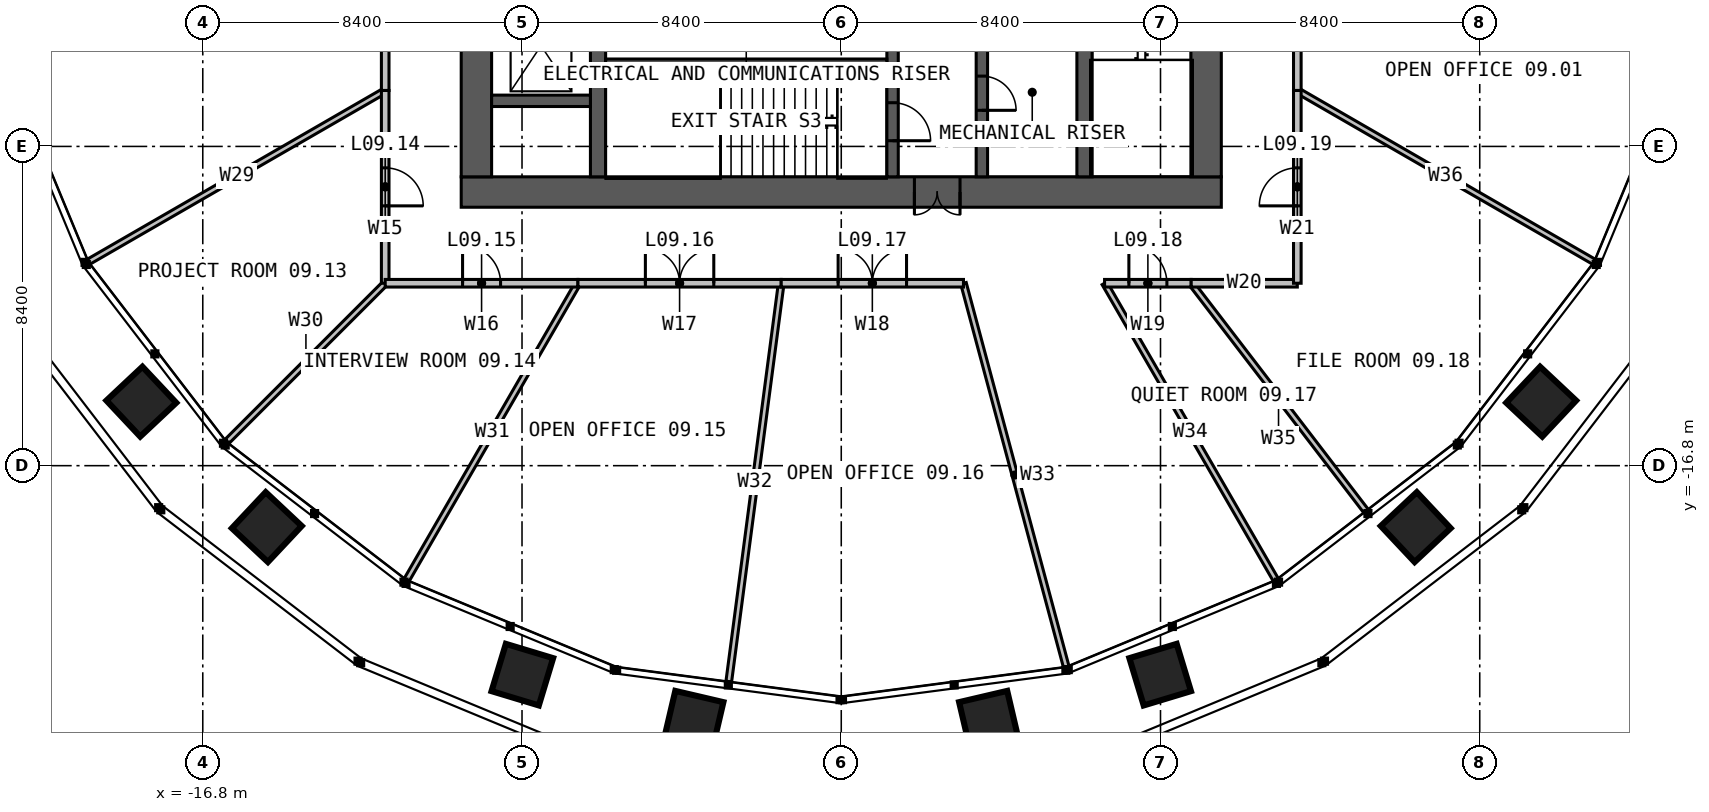
"""IFC4 building model, lengths in metres.
Left out: names, types, materials, properties, quantities, classifications, styles, units other than length and angle.
Written with IfcOpenShell. Run it as: python <this file> out.ifc"""

import sys

from ifc_helpers import new_model, si_unit, direction, frame, frame_2d, origin, place, context, subcontext, project, spatial, rectangle, extrude, element, fill, save


model = new_model("IFC4")
c1 = context("Model", 3, precision=1e-05, world=origin(), true_north=direction((0.0, 1.0)))
c2 = subcontext(c1, "Body", "Model", "MODEL_VIEW")
j1 = project(units=[si_unit("LENGTHUNIT", "METRE"), si_unit("PLANEANGLEUNIT", "RADIAN")], contexts=[c1])
p1 = place(None, origin())
s1 = spatial("IfcSite", under=j1, at=p1, CompositionType="ELEMENT")
p2 = place(p1, origin())
s2 = spatial("IfcBuilding", under=s1, at=p2, CompositionType="ELEMENT")
p3 = place(p2, frame((0.0, 0.0, 41.0)))
s3 = spatial("IfcBuildingStorey", under=s2, at=p3, CompositionType="ELEMENT", Elevation=41.0)
p4 = place(p3, frame((10.0, -9.6, 0.0), z_axis=(0.0, 0.0, 1.0), x_axis=(-1.0, 0.0, 0.0)))
e1 = element("IfcWall", 1, at=p4, inside=s3, PredefinedType="SOLIDWALL", context=c2, shape_type="SweptSolid", body=[
    extrude(rectangle(XDim=20.0, YDim=0.8, at=frame_2d((10.0, 0.0))), origin(), (0.0, 0.0, 1.0), 4.0),
])
p5 = place(p4, frame((6.875, 0.0, 0.0)))
e2 = element("IfcOpeningElement", 2, at=p5, cuts=e1, PredefinedType="OPENING", context=c2, shape_type="SweptSolid", body=[
    extrude(rectangle(XDim=1.2, YDim=2.2, at=frame_2d((0.6, 1.1))), frame((0.0, 0.41, 0.0), z_axis=(0.0, -1.0, 0.0), x_axis=(1.0, 0.0, 0.0)), (0.0, 0.0, 1.0), 0.82),
])
for number, where, z_axis, x_axis in (
    (3, (9.6, -9.2, 0.0), (0.0, 0.0, 1.0), (0.0, 1.0, 0.0)),
    (4, (-9.6, 9.2, 0.0), (0.0, 0.0, 1.0), (0.0, -1.0, 0.0)),
):
    element("IfcWall", number, at=place(p3, frame(where, z_axis=z_axis, x_axis=x_axis)), inside=s3, PredefinedType="SOLIDWALL", context=c2, shape_type="SweptSolid", body=[
        extrude(rectangle(XDim=18.4, YDim=0.8, at=frame_2d((9.2, 0.0))), origin(), (0.0, 0.0, 1.0), 4.0),
    ])
p6 = place(p3, frame((-6.4, -9.2, 0.0), z_axis=(0.0, 0.0, 1.0), x_axis=(0.0, 1.0, 0.0)))
e5 = element("IfcWall", 5, at=p6, inside=s3, PredefinedType="SOLIDWALL", context=c2, shape_type="SweptSolid", body=[
    extrude(rectangle(XDim=18.4, YDim=0.4, at=frame_2d((9.2, 0.0))), origin(), (0.0, 0.0, 1.0), 4.0),
])
p7 = place(p6, frame((8.7, 0.0, 0.0)))
e6 = element("IfcOpeningElement", 6, at=p7, cuts=e5, PredefinedType="OPENING", context=c2, shape_type="SweptSolid", body=[
    extrude(rectangle(XDim=1.0, YDim=2.2, at=frame_2d((0.5, 1.1))), frame((0.0, 0.21, 0.0), z_axis=(0.0, -1.0, 0.0), x_axis=(1.0, 0.0, 0.0)), (0.0, 0.0, 1.0), 0.42),
])
p8 = place(p3, frame((6.4, 9.2, 0.0), z_axis=(0.0, 0.0, 1.0), x_axis=(0.0, -1.0, 0.0)))
e7 = element("IfcWall", 7, at=p8, inside=s3, PredefinedType="SOLIDWALL", context=c2, shape_type="SweptSolid", body=[
    extrude(rectangle(XDim=18.4, YDim=0.4, at=frame_2d((9.2, 0.0))), origin(), (0.0, 0.0, 1.0), 4.0),
])
p9 = place(p8, frame((8.7, 0.0, 0.0)))
e8 = element("IfcOpeningElement", 8, at=p9, cuts=e7, PredefinedType="OPENING", context=c2, shape_type="SweptSolid", body=[
    extrude(rectangle(XDim=1.0, YDim=2.2, at=frame_2d((0.5, 1.1))), frame((0.0, 0.21, 0.0), z_axis=(0.0, -1.0, 0.0), x_axis=(1.0, 0.0, 0.0)), (0.0, 0.0, 1.0), 0.42),
])
p10 = place(p3, frame((1.35, -1.45, 0.0), z_axis=(0.0, 0.0, 1.0), x_axis=(0.0, -1.0, 0.0)))
e9 = element("IfcWall", 9, at=p10, inside=s3, PredefinedType="SOLIDWALL", context=c2, shape_type="SweptSolid", body=[
    extrude(rectangle(XDim=7.75, YDim=0.3, at=frame_2d((3.875, 0.0))), origin(), (0.0, 0.0, 1.0), 4.0),
])
p11 = place(p10, frame((5.8, 0.0, 0.0)))
e10 = element("IfcOpeningElement", 10, at=p11, cuts=e9, PredefinedType="OPENING", context=c2, shape_type="SweptSolid", body=[
    extrude(rectangle(XDim=1.0, YDim=2.2, at=frame_2d((0.5, 1.1))), frame((0.0, 0.16, 0.0), z_axis=(0.0, -1.0, 0.0), x_axis=(1.0, 0.0, 0.0)), (0.0, 0.0, 1.0), 0.32),
])
p12 = place(p10, frame((3.525, 0.0, 0.0)))
e11 = element("IfcOpeningElement", 11, at=p12, cuts=e9, PredefinedType="OPENING", context=c2, shape_type="SweptSolid", body=[
    extrude(rectangle(XDim=0.9, YDim=2.2, at=frame_2d((0.45, 1.1))), frame((0.0, 0.16, 0.0), z_axis=(0.0, -1.0, 0.0), x_axis=(1.0, 0.0, 0.0)), (0.0, 0.0, 1.0), 0.32),
])
p13 = place(p3, frame((3.7, -1.45, 0.0), z_axis=(0.0, 0.0, 1.0), x_axis=(0.0, -1.0, 0.0)))
e12 = element("IfcWall", 12, at=p13, inside=s3, PredefinedType="SOLIDWALL", context=c2, shape_type="SweptSolid", body=[
    extrude(rectangle(XDim=7.75, YDim=0.3, at=frame_2d((3.875, 0.0))), origin(), (0.0, 0.0, 1.0), 4.0),
])
p14 = place(p13, frame((5.1, 0.0, 0.0)))
e13 = element("IfcOpeningElement", 13, at=p14, cuts=e12, PredefinedType="OPENING", context=c2, shape_type="SweptSolid", body=[
    extrude(rectangle(XDim=0.9, YDim=2.2, at=frame_2d((0.45, 1.1))), frame((0.0, 0.16, 0.0), z_axis=(0.0, -1.0, 0.0), x_axis=(1.0, 0.0, 0.0)), (0.0, 0.0, 1.0), 0.32),
])
p15 = place(p3, frame((-6.2, -6.2, 0.0), z_axis=(0.0, 0.0, 1.0), x_axis=(1.0, 0.0, 0.0)))
e14 = element("IfcWall", 14, at=p15, inside=s3, PredefinedType="SOLIDWALL", context=c2, shape_type="SweptSolid", body=[
    extrude(rectangle(XDim=7.4, YDim=0.2, at=frame_2d((3.7, 0.0))), origin(), (0.0, 0.0, 1.0), 4.0),
])
p16 = place(p3, frame((-9.2, -7.2, 0.0), z_axis=(0.0, 0.0, 1.0), x_axis=(1.0, 0.0, 0.0)))
e15 = element("IfcWall", 15, at=p16, inside=s3, PredefinedType="SOLIDWALL", context=c2, shape_type="SweptSolid", body=[
    extrude(rectangle(XDim=2.6, YDim=0.3, at=frame_2d((1.3, 0.0))), origin(), (0.0, 0.0, 1.0), 4.0),
])
for number, where, z_axis, x_axis in (
    (16, (12.0, -6.928, 0.0), (0.0, 0.0, 1.0), (0.866, -0.5, 0.0)),
    (17, (-12.0, -6.928, 0.0), (0.0, 0.0, 1.0), (-0.866, -0.5, 0.0)),
):
    element("IfcWall", number, at=place(p3, frame(where, z_axis=z_axis, x_axis=x_axis)), inside=s3, PredefinedType="PARTITIONING", context=c2, shape_type="SweptSolid", body=[
        extrude(rectangle(XDim=9.014, YDim=0.15, at=frame_2d((4.507, 0.0))), origin(), (0.0, 0.0, 1.0), 2.79),
    ])
p17 = place(p3, frame((-12.0, -12.0, 0.0), z_axis=(0.0, 0.0, 1.0), x_axis=(-0.707106781187, -0.707106781187, 0.0)))
e18 = element("IfcWall", 18, at=p17, inside=s3, PredefinedType="PARTITIONING", context=c2, shape_type="SweptSolid", body=[
    extrude(rectangle(XDim=5.9, YDim=0.15, at=frame_2d((2.95, 0.0))), origin(), (0.0, 0.0, 1.0), 2.79),
])
p18 = place(p3, frame((-6.928, -12.0, 0.0), z_axis=(0.0, 0.0, 1.0), x_axis=(-0.49999598783, -0.866027720199, 0.0)))
e19 = element("IfcWall", 19, at=p18, inside=s3, PredefinedType="PARTITIONING", context=c2, shape_type="SweptSolid", body=[
    extrude(rectangle(XDim=9.014, YDim=0.15, at=frame_2d((4.507, 0.0))), origin(), (0.0, 0.0, 1.0), 2.79),
])
p19 = place(p3, frame((-1.58, -12.0, 0.0), z_axis=(0.0, 0.0, 1.0), x_axis=(-0.130535763012, -0.991443601308, 0.0)))
e20 = element("IfcWall", 20, at=p19, inside=s3, PredefinedType="PARTITIONING", context=c2, shape_type="SweptSolid", body=[
    extrude(rectangle(XDim=10.571, YDim=0.15, at=frame_2d((5.285, 0.0))), origin(), (0.0, 0.0, 1.0), 2.79),
])
p20 = place(p3, frame((3.215, -12.0, 0.0), z_axis=(0.0, 0.0, 1.0), x_axis=(0.25882174838, -0.965925101944, 0.0)))
e21 = element("IfcWall", 21, at=p20, inside=s3, PredefinedType="PARTITIONING", context=c2, shape_type="SweptSolid", body=[
    extrude(rectangle(XDim=10.447, YDim=0.15, at=frame_2d((5.223, 0.0))), origin(), (0.0, 0.0, 1.0), 2.79),
])
p21 = place(p3, frame((6.928, -12.0, 0.0), z_axis=(0.0, 0.0, 1.0), x_axis=(0.49999598783, -0.866027720199, 0.0)))
e22 = element("IfcWall", 22, at=p21, inside=s3, PredefinedType="PARTITIONING", context=c2, shape_type="SweptSolid", body=[
    extrude(rectangle(XDim=9.014, YDim=0.15, at=frame_2d((4.507, 0.0))), origin(), (0.0, 0.0, 1.0), 2.79),
])
p22 = place(p3, frame((9.208, -12.0, 0.0), z_axis=(0.0, 0.0, 1.0), x_axis=(0.608755356011, -0.793358000229, 0.0)))
e23 = element("IfcWall", 23, at=p22, inside=s3, PredefinedType="PARTITIONING", context=c2, shape_type="SweptSolid", body=[
    extrude(rectangle(XDim=7.549, YDim=0.15, at=frame_2d((3.774, 0.0))), origin(), (0.0, 0.0, 1.0), 2.79),
])
p23 = place(p3, frame((12.0, -6.928, 0.0), z_axis=(0.0, 0.0, 1.0), x_axis=(0.0, 1.0, 0.0)))
e24 = element("IfcWall", 24, at=p23, inside=s3, PredefinedType="PARTITIONING", context=c2, shape_type="SweptSolid", body=[
    extrude(rectangle(XDim=5.348, YDim=0.2, at=frame_2d((2.674, 0.0))), origin(), (0.0, 0.0, 1.0), 3.8),
])
p24 = place(p23, frame((1.774, 0.0, 0.0)))
e25 = element("IfcOpeningElement", 25, at=p24, cuts=e24, PredefinedType="OPENING", context=c2, shape_type="SweptSolid", body=[
    extrude(rectangle(XDim=1.8, YDim=2.2, at=frame_2d((0.9, 1.1))), frame((0.0, 0.11, 0.0), z_axis=(0.0, -1.0, 0.0), x_axis=(1.0, 0.0, 0.0)), (0.0, 0.0, 1.0), 0.22),
])
p25 = place(p3, frame((-12.0, 0.0, 0.0), z_axis=(0.0, 0.0, 1.0), x_axis=(0.0, -1.0, 0.0)))
e26 = element("IfcWall", 26, at=p25, inside=s3, PredefinedType="PARTITIONING", context=c2, shape_type="SweptSolid", body=[
    extrude(rectangle(XDim=6.928, YDim=0.2, at=frame_2d((3.464, 0.0))), origin(), (0.0, 0.0, 1.0), 3.8),
])
p26 = place(p25, frame((2.964, 0.0, 0.0)))
e27 = element("IfcOpeningElement", 27, at=p26, cuts=e26, PredefinedType="OPENING", context=c2, shape_type="SweptSolid", body=[
    extrude(rectangle(XDim=1.0, YDim=2.2, at=frame_2d((0.5, 1.1))), frame((0.0, 0.11, 0.0), z_axis=(0.0, -1.0, 0.0), x_axis=(1.0, 0.0, 0.0)), (0.0, 0.0, 1.0), 0.22),
])
p27 = place(p3, frame((-12.0, -6.928, 0.0), z_axis=(0.0, 0.0, 1.0), x_axis=(0.0, -1.0, 0.0)))
e28 = element("IfcWall", 28, at=p27, inside=s3, PredefinedType="PARTITIONING", context=c2, shape_type="SweptSolid", body=[
    extrude(rectangle(XDim=5.072, YDim=0.2, at=frame_2d((2.536, 0.0))), origin(), (0.0, 0.0, 1.0), 3.8),
])
p28 = place(p27, frame((2.036, 0.0, 0.0)))
e29 = element("IfcOpeningElement", 29, at=p28, cuts=e28, PredefinedType="OPENING", context=c2, shape_type="SweptSolid", body=[
    extrude(rectangle(XDim=1.0, YDim=2.2, at=frame_2d((0.5, 1.1))), frame((0.0, 0.11, 0.0), z_axis=(0.0, -1.0, 0.0), x_axis=(1.0, 0.0, 0.0)), (0.0, 0.0, 1.0), 0.22),
])
p29 = place(p3, frame((-12.0, -12.0, 0.0), z_axis=(0.0, 0.0, 1.0), x_axis=(1.0, 0.0, 0.0)))
e30 = element("IfcWall", 30, at=p29, inside=s3, PredefinedType="PARTITIONING", context=c2, shape_type="SweptSolid", body=[
    extrude(rectangle(XDim=5.072, YDim=0.2, at=frame_2d((2.536, 0.0))), origin(), (0.0, 0.0, 1.0), 3.8),
])
p30 = place(p29, frame((2.036, 0.0, 0.0)))
e31 = element("IfcOpeningElement", 31, at=p30, cuts=e30, PredefinedType="OPENING", context=c2, shape_type="SweptSolid", body=[
    extrude(rectangle(XDim=1.0, YDim=2.2, at=frame_2d((0.5, 1.1))), frame((0.0, 0.11, 0.0), z_axis=(0.0, -1.0, 0.0), x_axis=(1.0, 0.0, 0.0)), (0.0, 0.0, 1.0), 0.22),
])
p31 = place(p3, frame((-6.928, -12.0, 0.0), z_axis=(0.0, 0.0, 1.0), x_axis=(1.0, 0.0, 0.0)))
e32 = element("IfcWall", 32, at=p31, inside=s3, PredefinedType="PARTITIONING", context=c2, shape_type="SweptSolid", body=[
    extrude(rectangle(XDim=5.348, YDim=0.2, at=frame_2d((2.674, 0.0))), origin(), (0.0, 0.0, 1.0), 3.8),
])
p32 = place(p31, frame((1.774, 0.0, 0.0)))
e33 = element("IfcOpeningElement", 33, at=p32, cuts=e32, PredefinedType="OPENING", context=c2, shape_type="SweptSolid", body=[
    extrude(rectangle(XDim=1.8, YDim=2.2, at=frame_2d((0.9, 1.1))), frame((0.0, 0.11, 0.0), z_axis=(0.0, -1.0, 0.0), x_axis=(1.0, 0.0, 0.0)), (0.0, 0.0, 1.0), 0.22),
])
p33 = place(p3, frame((-1.58, -12.0, 0.0), z_axis=(0.0, 0.0, 1.0), x_axis=(1.0, 0.0, 0.0)))
e34 = element("IfcWall", 34, at=p33, inside=s3, PredefinedType="PARTITIONING", context=c2, shape_type="SweptSolid", body=[
    extrude(rectangle(XDim=4.795, YDim=0.2, at=frame_2d((2.397, 0.0))), origin(), (0.0, 0.0, 1.0), 3.8),
])
p34 = place(p33, frame((1.498, 0.0, 0.0)))
e35 = element("IfcOpeningElement", 35, at=p34, cuts=e34, PredefinedType="OPENING", context=c2, shape_type="SweptSolid", body=[
    extrude(rectangle(XDim=1.8, YDim=2.2, at=frame_2d((0.9, 1.1))), frame((0.0, 0.11, 0.0), z_axis=(0.0, -1.0, 0.0), x_axis=(1.0, 0.0, 0.0)), (0.0, 0.0, 1.0), 0.22),
])
p35 = place(p3, frame((6.928, -12.0, 0.0), z_axis=(0.0, 0.0, 1.0), x_axis=(1.0, 0.0, 0.0)))
e36 = element("IfcWall", 36, at=p35, inside=s3, PredefinedType="PARTITIONING", context=c2, shape_type="SweptSolid", body=[
    extrude(rectangle(XDim=2.28, YDim=0.2, at=frame_2d((1.14, 0.0))), origin(), (0.0, 0.0, 1.0), 3.8),
])
p36 = place(p35, frame((0.64, 0.0, 0.0)))
e37 = element("IfcOpeningElement", 37, at=p36, cuts=e36, PredefinedType="OPENING", context=c2, shape_type="SweptSolid", body=[
    extrude(rectangle(XDim=1.0, YDim=2.2, at=frame_2d((0.5, 1.1))), frame((0.0, 0.11, 0.0), z_axis=(0.0, -1.0, 0.0), x_axis=(1.0, 0.0, 0.0)), (0.0, 0.0, 1.0), 0.22),
])
p37 = place(p3, frame((9.208, -12.0, 0.0), z_axis=(0.0, 0.0, 1.0), x_axis=(1.0, 0.0, 0.0)))
e38 = element("IfcWall", 38, at=p37, inside=s3, PredefinedType="PARTITIONING", context=c2, shape_type="SweptSolid", body=[
    extrude(rectangle(XDim=2.792, YDim=0.2, at=frame_2d((1.396, 0.0))), origin(), (0.0, 0.0, 1.0), 3.8),
])
p38 = place(p3, frame((12.0, -12.0, 0.0), z_axis=(0.0, 0.0, 1.0), x_axis=(0.0, 1.0, 0.0)))
e39 = element("IfcWall", 39, at=p38, inside=s3, PredefinedType="PARTITIONING", context=c2, shape_type="SweptSolid", body=[
    extrude(rectangle(XDim=5.072, YDim=0.2, at=frame_2d((2.536, 0.0))), origin(), (0.0, 0.0, 1.0), 3.8),
])
p39 = place(p38, frame((2.036, 0.0, 0.0)))
e40 = element("IfcOpeningElement", 40, at=p39, cuts=e39, PredefinedType="OPENING", context=c2, shape_type="SweptSolid", body=[
    extrude(rectangle(XDim=1.0, YDim=2.2, at=frame_2d((0.5, 1.1))), frame((0.0, 0.11, 0.0), z_axis=(0.0, -1.0, 0.0), x_axis=(1.0, 0.0, 0.0)), (0.0, 0.0, 1.0), 0.22),
])
p40 = place(p5, origin())
e41 = element("IfcDoor", 41, at=p40, inside=s3, OperationType="DOUBLE_DOOR_SINGLE_SWING", PredefinedType="DOOR", context=c2, shape_type="SweptSolid", body=[
    extrude(rectangle(XDim=1.2, YDim=2.2, at=frame_2d((0.6, 1.1))), frame((0.0, 0.025, 0.0), z_axis=(0.0, -1.0, 0.0), x_axis=(1.0, 0.0, 0.0)), (0.0, 0.0, 1.0), 0.05),
])
fill(e2, e41)
p41 = place(p11, origin())
e42 = element("IfcDoor", 42, at=p41, inside=s3, OperationType="SINGLE_SWING_RIGHT", PredefinedType="DOOR", context=c2, shape_type="SweptSolid", body=[
    extrude(rectangle(XDim=1.0, YDim=2.2, at=frame_2d((0.5, 1.1))), frame((0.0, 0.025, 0.0), z_axis=(0.0, -1.0, 0.0), x_axis=(1.0, 0.0, 0.0)), (0.0, 0.0, 1.0), 0.05),
])
fill(e10, e42)
p42 = place(p14, origin())
e43 = element("IfcDoor", 43, at=p42, inside=s3, OperationType="SINGLE_SWING_RIGHT", PredefinedType="DOOR", context=c2, shape_type="SweptSolid", body=[
    extrude(rectangle(XDim=0.9, YDim=2.2, at=frame_2d((0.45, 1.1))), frame((0.0, 0.025, 0.0), z_axis=(0.0, -1.0, 0.0), x_axis=(1.0, 0.0, 0.0)), (0.0, 0.0, 1.0), 0.05),
])
fill(e13, e43)
p43 = place(p28, origin())
e44 = element("IfcDoor", 44, at=p43, inside=s3, OperationType="SINGLE_SWING_RIGHT", PredefinedType="DOOR", context=c2, shape_type="SweptSolid", body=[
    extrude(rectangle(XDim=1.0, YDim=2.2, at=frame_2d((0.5, 1.1))), frame((0.0, 0.025, 0.0), z_axis=(0.0, -1.0, 0.0), x_axis=(1.0, 0.0, 0.0)), (0.0, 0.0, 1.0), 0.05),
])
fill(e29, e44)
p44 = place(p30, origin())
e45 = element("IfcDoor", 45, at=p44, inside=s3, OperationType="SINGLE_SWING_LEFT", PredefinedType="DOOR", context=c2, shape_type="SweptSolid", body=[
    extrude(rectangle(XDim=1.0, YDim=2.2, at=frame_2d((0.5, 1.1))), frame((0.0, 0.025, 0.0), z_axis=(0.0, -1.0, 0.0), x_axis=(1.0, 0.0, 0.0)), (0.0, 0.0, 1.0), 0.05),
])
fill(e31, e45)
p45 = place(p32, origin())
e46 = element("IfcDoor", 46, at=p45, inside=s3, OperationType="DOUBLE_DOOR_SINGLE_SWING", PredefinedType="DOOR", context=c2, shape_type="SweptSolid", body=[
    extrude(rectangle(XDim=1.8, YDim=2.2, at=frame_2d((0.9, 1.1))), frame((0.0, 0.025, 0.0), z_axis=(0.0, -1.0, 0.0), x_axis=(1.0, 0.0, 0.0)), (0.0, 0.0, 1.0), 0.05),
])
fill(e33, e46)
p46 = place(p34, origin())
e47 = element("IfcDoor", 47, at=p46, inside=s3, OperationType="DOUBLE_DOOR_SINGLE_SWING", PredefinedType="DOOR", context=c2, shape_type="SweptSolid", body=[
    extrude(rectangle(XDim=1.8, YDim=2.2, at=frame_2d((0.9, 1.1))), frame((0.0, 0.025, 0.0), z_axis=(0.0, -1.0, 0.0), x_axis=(1.0, 0.0, 0.0)), (0.0, 0.0, 1.0), 0.05),
])
fill(e35, e47)
p47 = place(p36, origin())
e48 = element("IfcDoor", 48, at=p47, inside=s3, OperationType="SINGLE_SWING_LEFT", PredefinedType="DOOR", context=c2, shape_type="SweptSolid", body=[
    extrude(rectangle(XDim=1.0, YDim=2.2, at=frame_2d((0.5, 1.1))), frame((0.0, 0.025, 0.0), z_axis=(0.0, -1.0, 0.0), x_axis=(1.0, 0.0, 0.0)), (0.0, 0.0, 1.0), 0.05),
])
fill(e37, e48)
p48 = place(p39, origin())
e49 = element("IfcDoor", 49, at=p48, inside=s3, OperationType="SINGLE_SWING_LEFT", PredefinedType="DOOR", context=c2, shape_type="SweptSolid", body=[
    extrude(rectangle(XDim=1.0, YDim=2.2, at=frame_2d((0.5, 1.1))), frame((0.0, 0.025, 0.0), z_axis=(0.0, -1.0, 0.0), x_axis=(1.0, 0.0, 0.0)), (0.0, 0.0, 1.0), 0.05),
])
fill(e40, e49)
save(model, sys.argv[1])
